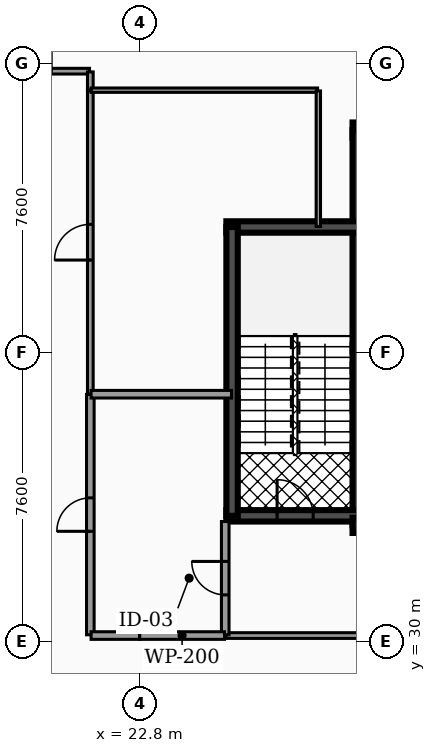
"""IFC4 building model, lengths in metres.
Left out: names, types, materials, properties, quantities, classifications, styles, units other than length and angle.
Written with IfcOpenShell. Run it as: python <this file> out.ifc"""

import sys

from ifc_helpers import new_model, si_unit, direction, frame, frame_2d, origin, origin_2d, place, context, subcontext, project, spatial, rectangle, hollow_rectangle, extrude, element, fill, save


model = new_model("IFC4")
c1 = context("Model", 3, precision=1e-05, world=origin(), true_north=direction((0.0, 1.0)))
c2 = subcontext(c1, "Body", "Model", "MODEL_VIEW")
j1 = project(units=[si_unit("LENGTHUNIT", "METRE"), si_unit("PLANEANGLEUNIT", "RADIAN")], contexts=[c1])
p1 = place(None, origin())
s1 = spatial("IfcSite", under=j1, at=p1, CompositionType="ELEMENT")
p2 = place(p1, origin())
s2 = spatial("IfcBuilding", under=s1, at=p2, CompositionType="ELEMENT")
p3 = place(p2, frame((0.0, 0.0, 18.36)))
s3 = spatial("IfcBuildingStorey", under=s2, at=p3, CompositionType="ELEMENT", Elevation=18.36)
p4 = place(p3, frame((28.4, 43.45, 0.0), z_axis=(0.0, 0.0, 1.0), x_axis=(1.0, 0.0, 0.0)))
e1 = element("IfcWall", 1, at=p4, inside=s3, PredefinedType="SHEAR", context=c2, shape_type="SweptSolid", body=[
    extrude(rectangle(XDim=20.06, YDim=0.4, at=frame_2d((10.03, 0.0))), origin(), (0.0, 0.0, 1.0), 4.07),
])
p5 = place(p3, frame((28.4, 33.25, 0.0), z_axis=(0.0, 0.0, 1.0), x_axis=(1.0, 0.0, 0.0)))
e2 = element("IfcWall", 2, at=p5, inside=s3, PredefinedType="SHEAR", context=c2, shape_type="SweptSolid", body=[
    extrude(rectangle(XDim=20.06, YDim=0.4, at=frame_2d((10.03, 0.0))), origin(), (0.0, 0.0, 1.0), 4.07),
])
p6 = place(p5, frame((4.03, 0.0, 0.0)))
e3 = element("IfcOpeningElement", 3, at=p6, cuts=e2, PredefinedType="OPENING", context=c2, shape_type="SweptSolid", body=[
    extrude(rectangle(XDim=1.1, YDim=2.15, at=frame_2d((0.55, 1.075))), frame((0.0, 0.21, 0.0), z_axis=(0.0, -1.0, 0.0), x_axis=(1.0, 0.0, 0.0)), (0.0, 0.0, 1.0), 0.42),
])
p7 = place(p5, frame((14.87, 0.0, 0.0)))
e4 = element("IfcOpeningElement", 4, at=p7, cuts=e2, PredefinedType="OPENING", context=c2, shape_type="SweptSolid", body=[
    extrude(rectangle(XDim=1.1, YDim=2.15, at=frame_2d((0.55, 1.075))), frame((0.0, 0.21, 0.0), z_axis=(0.0, -1.0, 0.0), x_axis=(1.0, 0.0, 0.0)), (0.0, 0.0, 1.0), 0.42),
])
p8 = place(p5, frame((1.31, 0.0, 0.0)))
e5 = element("IfcOpeningElement", 5, at=p8, cuts=e2, PredefinedType="OPENING", context=c2, shape_type="SweptSolid", body=[
    extrude(rectangle(XDim=1.1, YDim=2.2, at=frame_2d((0.55, 1.1))), frame((0.0, 0.21, 0.0), z_axis=(0.0, -1.0, 0.0), x_axis=(1.0, 0.0, 0.0)), (0.0, 0.0, 1.0), 0.42),
])
p9 = place(p5, frame((9.44, 0.0, 0.0)))
e6 = element("IfcOpeningElement", 6, at=p9, cuts=e2, PredefinedType="OPENING", context=c2, shape_type="SweptSolid", body=[
    extrude(rectangle(XDim=1.12, YDim=2.05, at=frame_2d((0.56, 1.025))), frame((0.0, 0.21, 0.0), z_axis=(0.0, -1.0, 0.0), x_axis=(1.0, 0.0, 0.0)), (0.0, 0.0, 1.0), 0.42),
])
p10 = place(p5, frame((17.65, 0.0, 0.0)))
e7 = element("IfcOpeningElement", 7, at=p10, cuts=e2, PredefinedType="OPENING", context=c2, shape_type="SweptSolid", body=[
    extrude(rectangle(XDim=1.1, YDim=2.2, at=frame_2d((0.55, 1.1))), frame((0.0, 0.21, 0.0), z_axis=(0.0, -1.0, 0.0), x_axis=(1.0, 0.0, 0.0)), (0.0, 0.0, 1.0), 0.42),
])
p11 = place(p3, frame((28.6, 33.25, 0.0), z_axis=(0.0, 0.0, 1.0), x_axis=(0.0, 1.0, 0.0)))
e8 = element("IfcWall", 8, at=p11, inside=s3, PredefinedType="SHEAR", context=c2, shape_type="SweptSolid", body=[
    extrude(rectangle(XDim=10.2, YDim=0.4, at=frame_2d((5.1, 0.0))), origin(), (0.0, 0.0, 1.0), 4.07),
])
p12 = place(p3, frame((25.08, 40.9, 0.0), z_axis=(0.0, 0.0, 1.0), x_axis=(1.0, 0.0, 0.0)))
e9 = element("IfcWall", 9, at=p12, inside=s3, PredefinedType="SHEAR", context=c2, shape_type="SweptSolid", body=[
    extrude(rectangle(XDim=3.52, YDim=0.3, at=frame_2d((1.76, 0.0))), origin(), (0.0, 0.0, 1.0), 4.07),
])
p13 = place(p3, frame((25.08, 33.3, 0.0), z_axis=(0.0, 0.0, 1.0), x_axis=(1.0, 0.0, 0.0)))
e10 = element("IfcWall", 10, at=p13, inside=s3, PredefinedType="SHEAR", context=c2, shape_type="SweptSolid", body=[
    extrude(rectangle(XDim=3.52, YDim=0.3, at=frame_2d((1.76, 0.0))), origin(), (0.0, 0.0, 1.0), 4.07),
])
p14 = place(p13, frame((1.335, 0.0, 0.0)))
e11 = element("IfcOpeningElement", 11, at=p14, cuts=e10, PredefinedType="OPENING", context=c2, shape_type="SweptSolid", body=[
    extrude(rectangle(XDim=0.95, YDim=2.2, at=frame_2d((0.475, 1.1))), frame((0.0, 0.16, 0.0), z_axis=(0.0, -1.0, 0.0), x_axis=(1.0, 0.0, 0.0)), (0.0, 0.0, 1.0), 0.32),
])
p15 = place(p3, frame((25.23, 33.3, 0.0), z_axis=(0.0, 0.0, 1.0), x_axis=(0.0, 1.0, 0.0)))
e12 = element("IfcWall", 12, at=p15, inside=s3, PredefinedType="SHEAR", context=c2, shape_type="SweptSolid", body=[
    extrude(rectangle(XDim=7.6, YDim=0.3, at=frame_2d((3.8, 0.0))), origin(), (0.0, 0.0, 1.0), 4.07),
])
p16 = place(p3, frame((28.6, 33.05, 0.0), z_axis=(0.0, 0.0, 1.0), x_axis=(1.0, 0.0, 0.0)))
e13 = element("IfcColumn", 13, at=p16, inside=s3, PredefinedType="PILASTER", context=c2, shape_type="SweptSolid", body=[
    extrude(hollow_rectangle(XDim=0.4, YDim=0.4, WallThickness=0.02, at=origin_2d()), origin(), (0.0, 0.0, 1.0), 4.07),
])
p17 = place(p3, frame((25.07, 30.15, 0.0), z_axis=(0.0, 0.0, 1.0), x_axis=(1.0, 0.0, 0.0)))
e14 = element("IfcWall", 14, at=p17, inside=s3, PredefinedType="PARTITIONING", context=c2, shape_type="SweptSolid", body=[
    extrude(rectangle(XDim=20.325, YDim=0.15, at=frame_2d((10.163, 0.0))), origin(), (0.0, 0.0, 1.0), 3.027),
])
p18 = place(p17, frame((7.492, 0.0, 0.0)))
e15 = element("IfcOpeningElement", 15, at=p18, cuts=e14, PredefinedType="OPENING", context=c2, shape_type="SweptSolid", body=[
    extrude(rectangle(XDim=0.94, YDim=2.05, at=frame_2d((0.47, 1.025))), frame((0.0, 0.085, 0.0), z_axis=(0.0, -1.0, 0.0), x_axis=(1.0, 0.0, 0.0)), (0.0, 0.0, 1.0), 0.17),
])
p19 = place(p3, frame((25.05, 30.17, 0.0), z_axis=(0.0, 0.0, 1.0), x_axis=(0.0, 1.0, 0.0)))
e16 = element("IfcWall", 16, at=p19, inside=s3, PredefinedType="PARTITIONING", context=c2, shape_type="SweptSolid", body=[
    extrude(rectangle(XDim=2.98, YDim=0.2, at=frame_2d((1.49, 0.0))), origin(), (0.0, 0.0, 1.0), 3.027),
])
p20 = place(p19, frame((1.05, 0.0, 0.0)))
e17 = element("IfcOpeningElement", 17, at=p20, cuts=e16, PredefinedType="OPENING", context=c2, shape_type="SweptSolid", body=[
    extrude(rectangle(XDim=0.88, YDim=2.05, at=frame_2d((0.44, 1.025))), frame((0.0, 0.11, 0.0), z_axis=(0.0, -1.0, 0.0), x_axis=(1.0, 0.0, 0.0)), (0.0, 0.0, 1.0), 0.22),
])
p21 = place(p3, frame((21.5, 30.17, 0.0), z_axis=(0.0, 0.0, 1.0), x_axis=(0.0, 1.0, 0.0)))
e18 = element("IfcWall", 18, at=p21, inside=s3, PredefinedType="PARTITIONING", context=c2, shape_type="SweptSolid", body=[
    extrude(rectangle(XDim=6.325, YDim=0.2, at=frame_2d((3.163, 0.0))), origin(), (0.0, 0.0, 1.0), 3.027),
])
p22 = place(p21, frame((2.722, 0.0, 0.0)))
e19 = element("IfcOpeningElement", 19, at=p22, cuts=e18, PredefinedType="OPENING", context=c2, shape_type="SweptSolid", body=[
    extrude(rectangle(XDim=0.88, YDim=2.05, at=frame_2d((0.44, 1.025))), frame((0.0, 0.11, 0.0), z_axis=(0.0, -1.0, 0.0), x_axis=(1.0, 0.0, 0.0)), (0.0, 0.0, 1.0), 0.22),
])
p23 = place(p3, frame((21.52, 30.15, 0.0), z_axis=(0.0, 0.0, 1.0), x_axis=(1.0, 0.0, 0.0)))
e20 = element("IfcWall", 20, at=p23, inside=s3, PredefinedType="PARTITIONING", context=c2, shape_type="SweptSolid", body=[
    extrude(rectangle(XDim=1.28, YDim=0.2, at=frame_2d((0.64, 0.0))), origin(), (0.0, 0.0, 1.0), 3.027),
])
p24 = place(p3, frame((22.8, 30.15, 0.0), z_axis=(0.0, 0.0, 1.0), x_axis=(1.0, 0.0, 0.0)))
e21 = element("IfcWall", 21, at=p24, inside=s3, PredefinedType="PARTITIONING", context=c2, shape_type="SweptSolid", body=[
    extrude(rectangle(XDim=2.23, YDim=0.2, at=frame_2d((1.115, 0.0))), origin(), (0.0, 0.0, 1.0), 3.027),
])
p25 = place(p3, frame((21.5, 36.505, 0.0), z_axis=(0.0, 0.0, 1.0), x_axis=(0.0, 1.0, 0.0)))
e22 = element("IfcWall", 22, at=p25, inside=s3, PredefinedType="PARTITIONING", context=c2, shape_type="SweptSolid", body=[
    extrude(rectangle(XDim=7.99, YDim=0.15, at=frame_2d((3.995, 0.0))), origin(), (0.0, 0.0, 1.0), 3.027),
])
p26 = place(p25, frame((3.525, 0.0, 0.0)))
e23 = element("IfcOpeningElement", 23, at=p26, cuts=e22, PredefinedType="OPENING", context=c2, shape_type="SweptSolid", body=[
    extrude(rectangle(XDim=0.94, YDim=2.05, at=frame_2d((0.47, 1.025))), frame((0.0, 0.085, 0.0), z_axis=(0.0, -1.0, 0.0), x_axis=(1.0, 0.0, 0.0)), (0.0, 0.0, 1.0), 0.17),
])
p27 = place(p3, frame((18.52, 45.0, 0.0), z_axis=(0.0, 0.0, 1.0), x_axis=(1.0, 0.0, 0.0)))
e24 = element("IfcWall", 24, at=p27, inside=s3, PredefinedType="PARTITIONING", context=c2, shape_type="SweptSolid", body=[
    extrude(rectangle(XDim=2.96, YDim=0.15, at=frame_2d((1.48, 0.0))), origin(), (0.0, 0.0, 1.0), 3.027),
])
p28 = place(p27, frame((1.01, 0.0, 0.0)))
e25 = element("IfcOpeningElement", 25, at=p28, cuts=e24, PredefinedType="OPENING", context=c2, shape_type="SweptSolid", body=[
    extrude(rectangle(XDim=0.94, YDim=2.05, at=frame_2d((0.47, 1.025))), frame((0.0, 0.085, 0.0), z_axis=(0.0, -1.0, 0.0), x_axis=(1.0, 0.0, 0.0)), (0.0, 0.0, 1.0), 0.17),
])
p29 = place(p3, frame((21.5, 44.505, 0.0), z_axis=(0.0, 0.0, 1.0), x_axis=(0.0, 1.0, 0.0)))
e26 = element("IfcWall", 26, at=p29, inside=s3, PredefinedType="PARTITIONING", context=c2, shape_type="SweptSolid", body=[
    extrude(rectangle(XDim=0.475, YDim=0.15, at=frame_2d((0.238, 0.0))), origin(), (0.0, 0.0, 1.0), 3.027),
])
p30 = place(p3, frame((21.52, 36.5, 0.0), z_axis=(0.0, 0.0, 1.0), x_axis=(1.0, 0.0, 0.0)))
e27 = element("IfcWall", 27, at=p30, inside=s3, PredefinedType="PARTITIONING", context=c2, shape_type="SweptSolid", body=[
    extrude(rectangle(XDim=3.695, YDim=0.2, at=frame_2d((1.848, 0.0))), origin(), (0.0, 0.0, 1.0), 3.027),
])
p31 = place(p3, frame((21.52, 44.5, 0.0), z_axis=(0.0, 0.0, 1.0), x_axis=(1.0, 0.0, 0.0)))
e28 = element("IfcWall", 28, at=p31, inside=s3, PredefinedType="MOVABLE", context=c2, shape_type="SweptSolid", body=[
    extrude(rectangle(XDim=5.96, YDim=0.115, at=frame_2d((2.98, 0.0))), origin(), (0.0, 0.0, 1.0), 3.027),
])
p32 = place(p3, frame((27.5, 40.915, 0.0), z_axis=(0.0, 0.0, 1.0), x_axis=(0.0, 1.0, 0.0)))
e29 = element("IfcWall", 29, at=p32, inside=s3, PredefinedType="MOVABLE", context=c2, shape_type="SweptSolid", body=[
    extrude(rectangle(XDim=3.565, YDim=0.115, at=frame_2d((1.782, 0.0))), origin(), (0.0, 0.0, 1.0), 3.027),
])
p33 = place(p14, origin())
e30 = element("IfcDoor", 30, at=p33, inside=s3, OperationType="SINGLE_SWING_LEFT", PredefinedType="DOOR", context=c2, shape_type="SweptSolid", body=[
    extrude(rectangle(XDim=0.95, YDim=2.2, at=frame_2d((0.475, 1.1))), frame((0.0, 0.025, 0.0), z_axis=(0.0, -1.0, 0.0), x_axis=(1.0, 0.0, 0.0)), (0.0, 0.0, 1.0), 0.05),
])
fill(e11, e30)
p34 = place(p20, origin())
e31 = element("IfcDoor", 31, at=p34, inside=s3, OperationType="SINGLE_SWING_RIGHT", PredefinedType="DOOR", context=c2, shape_type="SweptSolid", body=[
    extrude(rectangle(XDim=0.88, YDim=2.05, at=frame_2d((0.44, 1.025))), frame((0.0, 0.025, 0.0), z_axis=(0.0, -1.0, 0.0), x_axis=(1.0, 0.0, 0.0)), (0.0, 0.0, 1.0), 0.05),
])
fill(e17, e31)
p35 = place(p22, origin())
e32 = element("IfcDoor", 32, at=p35, inside=s3, OperationType="SINGLE_SWING_LEFT", PredefinedType="DOOR", context=c2, shape_type="SweptSolid", body=[
    extrude(rectangle(XDim=0.88, YDim=2.05, at=frame_2d((0.44, 1.025))), frame((0.0, 0.025, 0.0), z_axis=(0.0, -1.0, 0.0), x_axis=(1.0, 0.0, 0.0)), (0.0, 0.0, 1.0), 0.05),
])
fill(e19, e32)
p36 = place(p26, origin())
e33 = element("IfcDoor", 33, at=p36, inside=s3, OperationType="SINGLE_SWING_LEFT", PredefinedType="DOOR", context=c2, shape_type="SweptSolid", body=[
    extrude(rectangle(XDim=0.94, YDim=2.05, at=frame_2d((0.47, 1.025))), frame((0.0, 0.025, 0.0), z_axis=(0.0, -1.0, 0.0), x_axis=(1.0, 0.0, 0.0)), (0.0, 0.0, 1.0), 0.05),
])
fill(e23, e33)
save(model, sys.argv[1])
